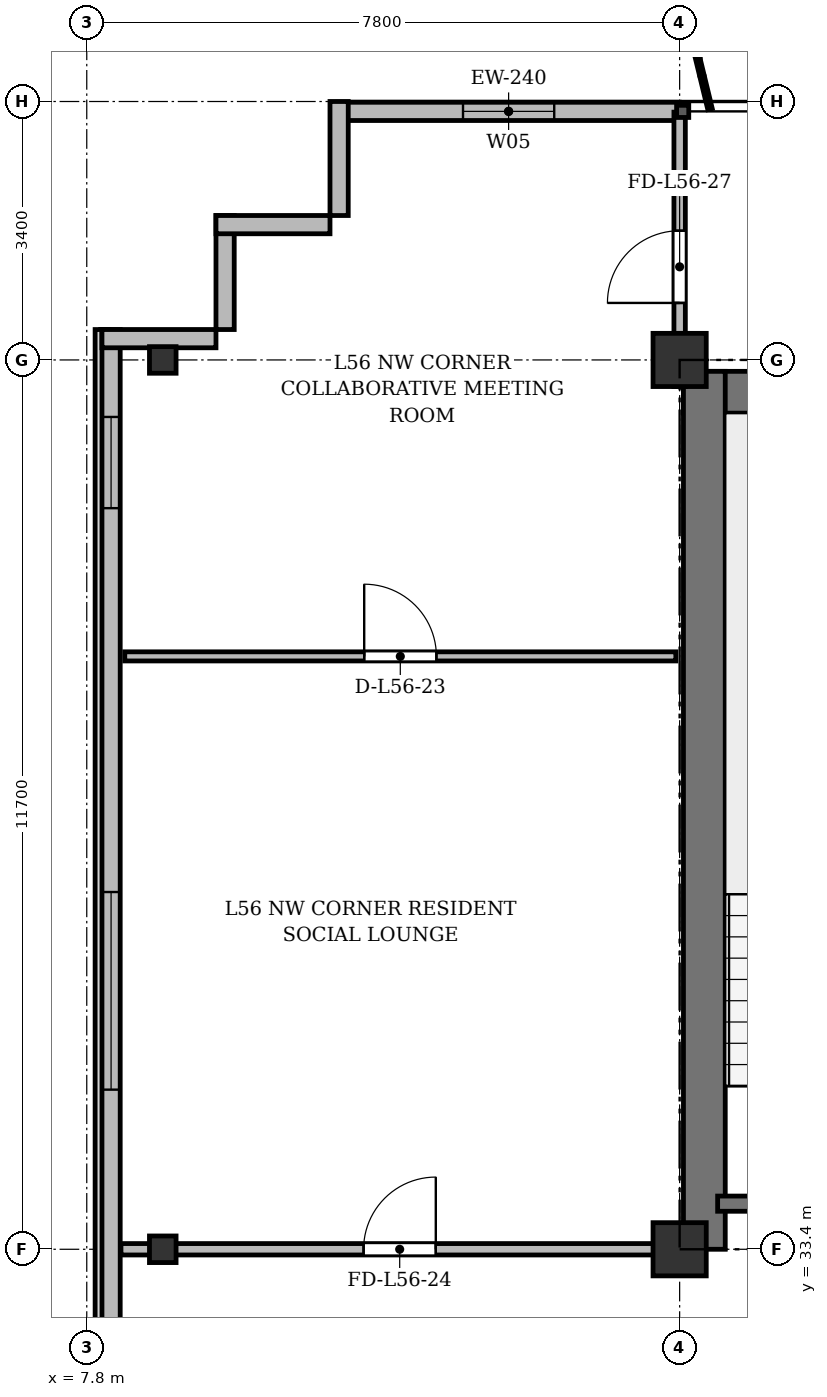
"""IFC4 building model, lengths in metres.
Left out: names, types, materials, properties, quantities, classifications, styles, units other than length and angle.
Written with IfcOpenShell. Run it as: python <this file> out.ifc"""

import sys

from ifc_helpers import new_model, si_unit, direction, frame, frame_2d, origin, origin_2d, place, context, subcontext, project, spatial, rectangle, i_section, extrude, source, transform, mapped, element, fill, save


model = new_model("IFC4")
c1 = context("Model", 3, precision=1e-05, world=origin(), true_north=direction((0.0, 1.0)))
c2 = subcontext(c1, "Body", "Model", "MODEL_VIEW")
j1 = project(units=[si_unit("LENGTHUNIT", "METRE"), si_unit("PLANEANGLEUNIT", "RADIAN")], contexts=[c1])
p1 = place(None, origin())
s1 = spatial("IfcSite", under=j1, at=p1, CompositionType="ELEMENT")
p2 = place(p1, origin())
s2 = spatial("IfcBuilding", under=s1, at=p2, CompositionType="ELEMENT")
p3 = place(p2, frame((0.0, 0.0, 215.7)))
s3 = spatial("IfcBuildingStorey", under=s2, at=p3, CompositionType="ELEMENT", Elevation=215.7)
m1 = source(origin(), c2, "Body", "SweptSolid", [
    extrude(i_section(OverallWidth=0.35, OverallDepth=0.35, WebThickness=0.018, FlangeThickness=0.028, at=origin_2d()), origin(), (0.0, 0.0, 1.0), 3.6),
])
for number, where, z_axis, x_axis in (
    (1, (8.8, 33.4, 0.0), (0.0, 0.0, 1.0), (1.0, 0.0, 0.0)),
    (2, (8.8, 45.1, 0.0), (0.0, 0.0, 1.0), (1.0, 0.0, 0.0)),
):
    element("IfcColumn", number, at=place(p3, frame(where, z_axis=z_axis, x_axis=x_axis)), inside=s3, PredefinedType="COLUMN", context=c2, shape_type="MappedRepresentation", body=[
        mapped(m1, transform((0.0, 0.0, 0.0), x_axis=(1.0, 0.0, 0.0), y_axis=(0.0, 1.0, 0.0), z_axis=(0.0, 0.0, 1.0), scale=1.0)),
    ])
m2 = source(origin(), c2, "Body", "SweptSolid", [
    extrude(rectangle(XDim=0.7, YDim=0.7, at=origin_2d()), origin(), (0.0, 0.0, 1.0), 3.6),
])
for number, where, z_axis, x_axis in (
    (3, (15.6, 33.4, 0.0), (0.0, 0.0, 1.0), (1.0, 0.0, 0.0)),
    (4, (15.6, 45.1, 0.0), (0.0, 0.0, 1.0), (1.0, 0.0, 0.0)),
):
    element("IfcColumn", number, at=place(p3, frame(where, z_axis=z_axis, x_axis=x_axis)), inside=s3, PredefinedType="COLUMN", context=c2, shape_type="MappedRepresentation", body=[
        mapped(m2, transform((0.0, 0.0, 0.0), x_axis=(1.0, 0.0, 0.0), y_axis=(0.0, 1.0, 0.0), z_axis=(0.0, 0.0, 1.0), scale=1.0)),
    ])
p4 = place(p3, frame((11.1, 48.37, 0.0), z_axis=(0.0, 0.0, 1.0), x_axis=(1.0, 0.0, 0.0)))
e5 = element("IfcWall", 5, at=p4, inside=s3, PredefinedType="SOLIDWALL", context=c2, shape_type="SweptSolid", body=[
    extrude(rectangle(XDim=4.5, YDim=0.24, at=frame_2d((2.25, 0.0))), origin(), (0.0, 0.0, 1.0), 3.36),
])
p5 = place(p4, frame((1.65, 0.0, 0.9)))
e6 = element("IfcOpeningElement", 6, at=p5, cuts=e5, PredefinedType="OPENING", context=c2, shape_type="SweptSolid", body=[
    extrude(rectangle(XDim=1.2, YDim=1.65, at=frame_2d((0.6, 0.825))), frame((0.0, 0.13, 0.0), z_axis=(0.0, -1.0, 0.0), x_axis=(1.0, 0.0, 0.0)), (0.0, 0.0, 1.0), 0.26),
])
p6 = place(p3, frame((8.12, 6.4, 0.0), z_axis=(0.0, 0.0, 1.0), x_axis=(0.0, 1.0, 0.0)))
e7 = element("IfcWall", 7, at=p6, inside=s3, PredefinedType="SOLIDWALL", context=c2, shape_type="SweptSolid", body=[
    extrude(rectangle(XDim=39.1, YDim=0.24, at=frame_2d((19.55, 0.0))), origin(), (0.0, 0.0, 1.0), 3.36),
])
p7 = place(p6, frame((1.45, 0.0, 0.92)))
e8 = element("IfcOpeningElement", 8, at=p7, cuts=e7, PredefinedType="OPENING", context=c2, shape_type="SweptSolid", body=[
    extrude(rectangle(XDim=1.2, YDim=1.65, at=frame_2d((0.6, 0.825))), frame((0.0, 0.13, 0.0), z_axis=(0.0, -1.0, 0.0), x_axis=(1.0, 0.0, 0.0)), (0.0, 0.0, 1.0), 0.26),
])
p8 = place(p6, frame((3.7, 0.0, 0.92)))
e9 = element("IfcOpeningElement", 9, at=p8, cuts=e7, PredefinedType="OPENING", context=c2, shape_type="SweptSolid", body=[
    extrude(rectangle(XDim=2.6, YDim=1.9, at=frame_2d((1.3, 0.95))), frame((0.0, 0.13, 0.0), z_axis=(0.0, -1.0, 0.0), x_axis=(1.0, 0.0, 0.0)), (0.0, 0.0, 1.0), 0.26),
])
p9 = place(p6, frame((7.9, 0.0, 0.92)))
e10 = element("IfcOpeningElement", 10, at=p9, cuts=e7, PredefinedType="OPENING", context=c2, shape_type="SweptSolid", body=[
    extrude(rectangle(XDim=2.6, YDim=1.9, at=frame_2d((1.3, 0.95))), frame((0.0, 0.13, 0.0), z_axis=(0.0, -1.0, 0.0), x_axis=(1.0, 0.0, 0.0)), (0.0, 0.0, 1.0), 0.26),
])
p10 = place(p6, frame((15.1, 0.0, 0.92)))
e11 = element("IfcOpeningElement", 11, at=p10, cuts=e7, PredefinedType="OPENING", context=c2, shape_type="SweptSolid", body=[
    extrude(rectangle(XDim=2.6, YDim=1.9, at=frame_2d((1.3, 0.95))), frame((0.0, 0.13, 0.0), z_axis=(0.0, -1.0, 0.0), x_axis=(1.0, 0.0, 0.0)), (0.0, 0.0, 1.0), 0.26),
])
p11 = place(p6, frame((29.1, 0.0, 0.92)))
e12 = element("IfcOpeningElement", 12, at=p11, cuts=e7, PredefinedType="OPENING", context=c2, shape_type="SweptSolid", body=[
    extrude(rectangle(XDim=2.6, YDim=1.9, at=frame_2d((1.3, 0.95))), frame((0.0, 0.13, 0.0), z_axis=(0.0, -1.0, 0.0), x_axis=(1.0, 0.0, 0.0)), (0.0, 0.0, 1.0), 0.26),
])
p12 = place(p6, frame((36.75, 0.0, 0.92)))
e13 = element("IfcOpeningElement", 13, at=p12, cuts=e7, PredefinedType="OPENING", context=c2, shape_type="SweptSolid", body=[
    extrude(rectangle(XDim=1.2, YDim=1.65, at=frame_2d((0.6, 0.825))), frame((0.0, 0.13, 0.0), z_axis=(0.0, -1.0, 0.0), x_axis=(1.0, 0.0, 0.0)), (0.0, 0.0, 1.0), 0.26),
])
for number, where, z_axis, x_axis in (
    (14, (8.0, 45.38, 0.0), (0.0, 0.0, 1.0), (1.0, 0.0, 0.0)),
    (15, (9.62, 45.5, 0.0), (0.0, 0.0, 1.0), (0.0, 1.0, 0.0)),
    (16, (9.5, 46.88, 0.0), (0.0, 0.0, 1.0), (1.0, 0.0, 0.0)),
    (17, (11.12, 47.0, 0.0), (0.0, 0.0, 1.0), (0.0, 1.0, 0.0)),
):
    element("IfcWall", number, at=place(p3, frame(where, z_axis=z_axis, x_axis=x_axis)), inside=s3, PredefinedType="SOLIDWALL", context=c2, shape_type="SweptSolid", body=[
        extrude(rectangle(XDim=1.5, YDim=0.24, at=frame_2d((0.75, 0.0))), origin(), (0.0, 0.0, 1.0), 3.36),
    ])
p13 = place(p3, frame((15.65, 44.675, 0.0), z_axis=(0.0, 0.0, 1.0), x_axis=(1.0, 0.0, 0.0)))
e18 = element("IfcWall", 18, at=p13, inside=s3, PredefinedType="SHEAR", context=c2, shape_type="SweptSolid", body=[
    extrude(rectangle(XDim=43.1, YDim=0.55, at=frame_2d((21.55, 0.0))), origin(), (0.0, 0.0, 1.0), 3.36),
])
p14 = place(p3, frame((15.925, 33.4, 0.0), z_axis=(0.0, 0.0, 1.0), x_axis=(0.0, 1.0, 0.0)))
e19 = element("IfcWall", 19, at=p14, inside=s3, PredefinedType="SHEAR", context=c2, shape_type="SweptSolid", body=[
    extrude(rectangle(XDim=11.55, YDim=0.55, at=frame_2d((5.775, 0.0))), origin(), (0.0, 0.0, 1.0), 3.36),
])
p15 = place(p3, frame((16.1, 34.0, 0.0), z_axis=(0.0, 0.0, 1.0), x_axis=(1.0, 0.0, 0.0)))
e20 = element("IfcWall", 20, at=p15, inside=s3, PredefinedType="SHEAR", context=c2, shape_type="SweptSolid", body=[
    extrude(rectangle(XDim=3.4, YDim=0.2, at=frame_2d((1.7, 0.0))), origin(), (0.0, 0.0, 1.0), 3.36),
])
p16 = place(p3, frame((8.3, 41.2, 0.0), z_axis=(0.0, 0.0, 1.0), x_axis=(1.0, 0.0, 0.0)))
e21 = element("IfcWall", 21, at=p16, inside=s3, PredefinedType="PARTITIONING", context=c2, shape_type="SweptSolid", body=[
    extrude(rectangle(XDim=7.25, YDim=0.12, at=frame_2d((3.625, 0.0))), origin(), (0.0, 0.0, 1.0), 2.86),
])
p17 = place(p16, frame((3.15, 0.0, 0.0)))
e22 = element("IfcOpeningElement", 22, at=p17, cuts=e21, PredefinedType="OPENING", context=c2, shape_type="SweptSolid", body=[
    extrude(rectangle(XDim=0.95, YDim=2.15, at=frame_2d((0.475, 1.075))), frame((0.0, 0.07, 0.0), z_axis=(0.0, -1.0, 0.0), x_axis=(1.0, 0.0, 0.0)), (0.0, 0.0, 1.0), 0.14),
])
p18 = place(p3, frame((8.25, 33.4, 0.0), z_axis=(0.0, 0.0, 1.0), x_axis=(1.0, 0.0, 0.0)))
e23 = element("IfcWall", 23, at=p18, inside=s3, PredefinedType="PARTITIONING", context=c2, shape_type="SweptSolid", body=[
    extrude(rectangle(XDim=7.35, YDim=0.15, at=frame_2d((3.675, 0.0))), origin(), (0.0, 0.0, 1.0), 2.91),
])
p19 = place(p18, frame((3.192, 0.0, 0.0)))
e24 = element("IfcOpeningElement", 24, at=p19, cuts=e23, PredefinedType="OPENING", context=c2, shape_type="SweptSolid", body=[
    extrude(rectangle(XDim=0.95, YDim=2.15, at=frame_2d((0.475, 1.075))), frame((0.0, 0.085, 0.0), z_axis=(0.0, -1.0, 0.0), x_axis=(1.0, 0.0, 0.0)), (0.0, 0.0, 1.0), 0.17),
])
p20 = place(p3, frame((15.6, 44.75, 0.0), z_axis=(0.0, 0.0, 1.0), x_axis=(0.0, 1.0, 0.0)))
e25 = element("IfcWall", 25, at=p20, inside=s3, PredefinedType="PARTITIONING", context=c2, shape_type="SweptSolid", body=[
    extrude(rectangle(XDim=3.61, YDim=0.15, at=frame_2d((1.805, 0.0))), origin(), (0.0, 0.0, 1.0), 2.86),
])
p21 = place(p20, frame((1.1, 0.0, 0.0)))
e26 = element("IfcOpeningElement", 26, at=p21, cuts=e25, PredefinedType="OPENING", context=c2, shape_type="SweptSolid", body=[
    extrude(rectangle(XDim=0.95, YDim=2.15, at=frame_2d((0.475, 1.075))), frame((0.0, 0.085, 0.0), z_axis=(0.0, -1.0, 0.0), x_axis=(1.0, 0.0, 0.0)), (0.0, 0.0, 1.0), 0.17),
])
m3 = source(origin(), c2, "Body", "SweptSolid", [
    extrude(rectangle(XDim=1.2, YDim=1.65, at=frame_2d((0.6, 0.825))), frame((0.0, 0.03, 0.0), z_axis=(0.0, -1.0, 0.0), x_axis=(1.0, 0.0, 0.0)), (0.0, 0.0, 1.0), 0.06),
])
p22 = place(p5, origin())
e27 = element("IfcWindow", 27, at=p22, inside=s3, PartitioningType="SINGLE_PANEL", PredefinedType="WINDOW", context=c2, shape_type="MappedRepresentation", body=[
    mapped(m3, transform((0.0, 0.0, 0.0), x_axis=(1.0, 0.0, 0.0), y_axis=(0.0, 1.0, 0.0), z_axis=(0.0, 0.0, 1.0), scale=1.0)),
])
fill(e6, e27)
m4 = source(origin(), c2, "Body", "SweptSolid", [
    extrude(rectangle(XDim=2.6, YDim=1.9, at=frame_2d((1.3, 0.95))), frame((0.0, 0.03, 0.0), z_axis=(0.0, -1.0, 0.0), x_axis=(1.0, 0.0, 0.0)), (0.0, 0.0, 1.0), 0.06),
])
p23 = place(p11, origin())
e28 = element("IfcWindow", 28, at=p23, inside=s3, PartitioningType="SINGLE_PANEL", PredefinedType="WINDOW", context=c2, shape_type="MappedRepresentation", body=[
    mapped(m4, transform((0.0, 0.0, 0.0), x_axis=(1.0, 0.0, 0.0), y_axis=(0.0, 1.0, 0.0), z_axis=(0.0, 0.0, 1.0), scale=1.0)),
])
fill(e12, e28)
p24 = place(p12, origin())
e29 = element("IfcWindow", 29, at=p24, inside=s3, PartitioningType="SINGLE_PANEL", PredefinedType="WINDOW", context=c2, shape_type="MappedRepresentation", body=[
    mapped(m3, transform((0.0, 0.0, 0.0), x_axis=(1.0, 0.0, 0.0), y_axis=(0.0, 1.0, 0.0), z_axis=(0.0, 0.0, 1.0), scale=1.0)),
])
fill(e13, e29)
m5 = source(origin(), c2, "Body", "SweptSolid", [
    extrude(rectangle(XDim=0.95, YDim=2.15, at=frame_2d((0.475, 1.075))), frame((0.0, 0.025, 0.0), z_axis=(0.0, -1.0, 0.0), x_axis=(1.0, 0.0, 0.0)), (0.0, 0.0, 1.0), 0.05),
])
p25 = place(p17, origin())
e30 = element("IfcDoor", 30, at=p25, inside=s3, OperationType="SINGLE_SWING_LEFT", PredefinedType="DOOR", context=c2, shape_type="MappedRepresentation", body=[
    mapped(m5, transform((0.0, 0.0, 0.0), x_axis=(1.0, 0.0, 0.0), y_axis=(0.0, 1.0, 0.0), z_axis=(0.0, 0.0, 1.0), scale=1.0)),
])
fill(e22, e30)
p26 = place(p19, origin())
e31 = element("IfcDoor", 31, at=p26, inside=s3, OperationType="SINGLE_SWING_RIGHT", PredefinedType="DOOR", context=c2, shape_type="MappedRepresentation", body=[
    mapped(m5, transform((0.0, 0.0, 0.0), x_axis=(1.0, 0.0, 0.0), y_axis=(0.0, 1.0, 0.0), z_axis=(0.0, 0.0, 1.0), scale=1.0)),
])
fill(e24, e31)
p27 = place(p21, origin())
e32 = element("IfcDoor", 32, at=p27, inside=s3, OperationType="SINGLE_SWING_LEFT", PredefinedType="DOOR", context=c2, shape_type="MappedRepresentation", body=[
    mapped(m5, transform((0.0, 0.0, 0.0), x_axis=(1.0, 0.0, 0.0), y_axis=(0.0, 1.0, 0.0), z_axis=(0.0, 0.0, 1.0), scale=1.0)),
])
fill(e26, e32)
save(model, sys.argv[1])
